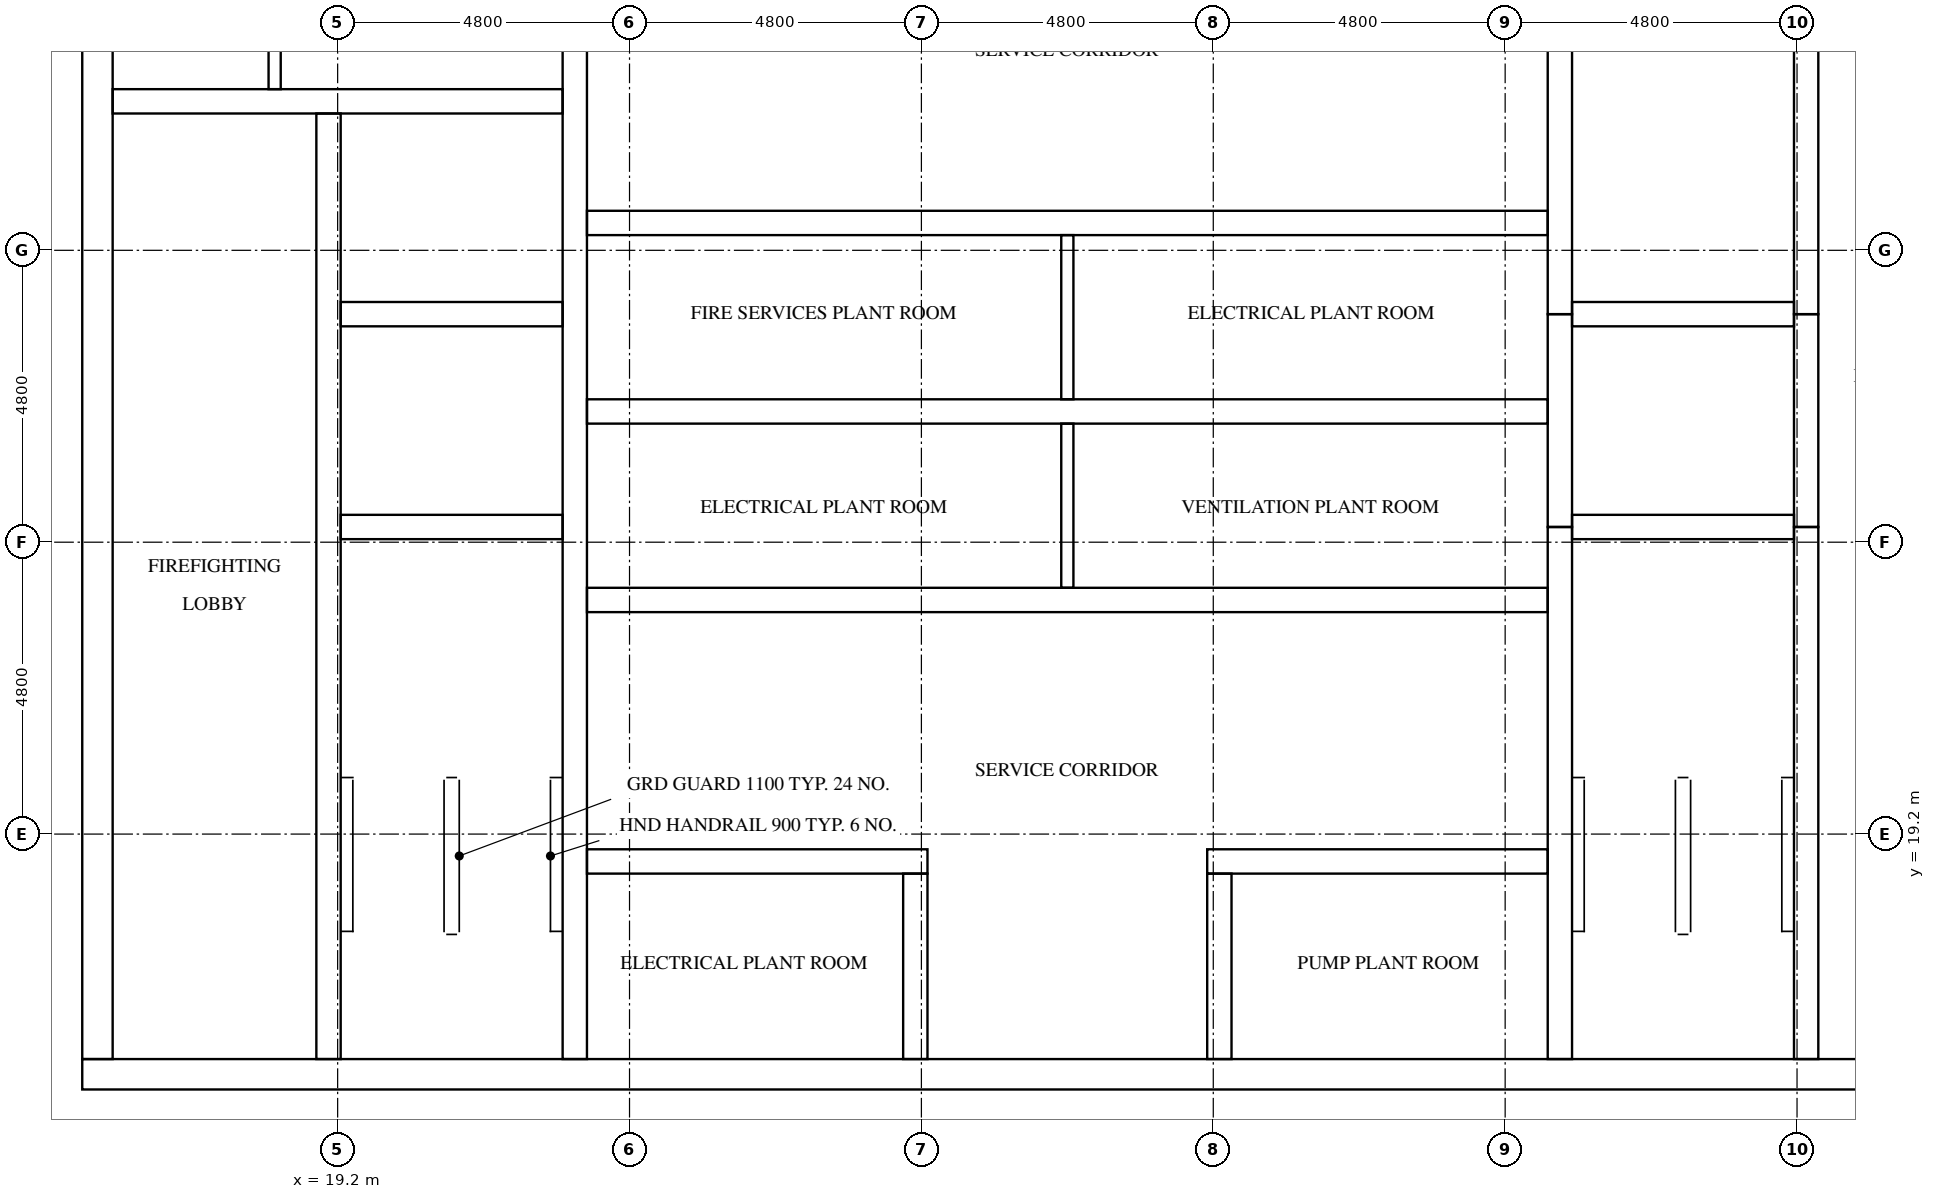
"""IFC4 building model, lengths in metres.
Left out: names, types, materials, properties, quantities, classifications, styles, units other than length and angle.
Written with IfcOpenShell. Run it as: python <this file> out.ifc"""

import sys

from ifc_helpers import new_model, si_unit, direction, frame, frame_2d, origin, place, context, subcontext, project, spatial, rectangle, extrude, element, fill, save


model = new_model("IFC4")
c1 = context("Model", 3, precision=1e-05, world=origin(), true_north=direction((0.0, 1.0)))
c2 = subcontext(c1, "Body", "Model", "MODEL_VIEW")
j1 = project(units=[si_unit("LENGTHUNIT", "METRE"), si_unit("PLANEANGLEUNIT", "RADIAN")], contexts=[c1])
p1 = place(None, origin())
s1 = spatial("IfcSite", under=j1, at=p1, CompositionType="ELEMENT")
p2 = place(p1, origin())
s2 = spatial("IfcBuilding", under=s1, at=p2, CompositionType="ELEMENT")
p3 = place(p2, frame((0.0, 0.0, 314.3)))
s3 = spatial("IfcBuildingStorey", under=s2, at=p3, CompositionType="ELEMENT", Elevation=314.3)
p4 = place(p3, frame((15.0, 15.25, 0.0), z_axis=(0.0, 0.0, 1.0), x_axis=(1.0, 0.0, 0.0)))
e1 = element("IfcWall", 1, at=p4, inside=s3, PredefinedType="SHEAR", context=c2, shape_type="SweptSolid", body=[
    extrude(rectangle(XDim=32.4, YDim=0.5, at=frame_2d((16.2, 0.0))), origin(), (0.0, 0.0, 1.0), 2.6),
])
p5 = place(p4, frame((15.3, 0.0, 0.0)))
e2 = element("IfcOpeningElement", 2, at=p5, cuts=e1, PredefinedType="OPENING", context=c2, shape_type="SweptSolid", body=[
    extrude(rectangle(XDim=1.8, YDim=2.1, at=frame_2d((0.9, 1.05))), frame((0.0, 0.26, 0.0), z_axis=(0.0, -1.0, 0.0), x_axis=(1.0, 0.0, 0.0)), (0.0, 0.0, 1.0), 0.52),
])
p6 = place(p3, frame((15.25, 15.5, 0.0), z_axis=(0.0, 0.0, 1.0), x_axis=(0.0, 1.0, 0.0)))
e3 = element("IfcWall", 3, at=p6, inside=s3, PredefinedType="SHEAR", context=c2, shape_type="SweptSolid", body=[
    extrude(rectangle(XDim=21.8, YDim=0.5, at=frame_2d((10.9, 0.0))), origin(), (0.0, 0.0, 1.0), 2.6),
])
p7 = place(p6, frame((5.26, 0.0, 0.0)))
e4 = element("IfcOpeningElement", 4, at=p7, cuts=e3, PredefinedType="OPENING", context=c2, shape_type="SweptSolid", body=[
    extrude(rectangle(XDim=1.2, YDim=2.1, at=frame_2d((0.6, 1.05))), frame((0.0, 0.26, 0.0), z_axis=(0.0, -1.0, 0.0), x_axis=(1.0, 0.0, 0.0)), (0.0, 0.0, 1.0), 0.52),
])
p8 = place(p3, frame((19.05, 15.5, 0.0), z_axis=(0.0, 0.0, 1.0), x_axis=(0.0, 1.0, 0.0)))
e5 = element("IfcWall", 5, at=p8, inside=s3, PredefinedType="SHEAR", context=c2, shape_type="SweptSolid", body=[
    extrude(rectangle(XDim=15.55, YDim=0.4, at=frame_2d((7.775, 0.0))), origin(), (0.0, 0.0, 1.0), 2.6),
])
p9 = place(p8, frame((9.95, 0.0, 0.0)))
e6 = element("IfcOpeningElement", 6, at=p9, cuts=e5, PredefinedType="OPENING", context=c2, shape_type="SweptSolid", body=[
    extrude(rectangle(XDim=1.1, YDim=2.1, at=frame_2d((0.55, 1.05))), frame((0.0, 0.21, 0.0), z_axis=(0.0, -1.0, 0.0), x_axis=(1.0, 0.0, 0.0)), (0.0, 0.0, 1.0), 0.42),
])
p10 = place(p8, frame((13.45, 0.0, 0.0)))
e7 = element("IfcOpeningElement", 7, at=p10, cuts=e5, PredefinedType="OPENING", context=c2, shape_type="SweptSolid", body=[
    extrude(rectangle(XDim=1.1, YDim=2.1, at=frame_2d((0.55, 1.05))), frame((0.0, 0.21, 0.0), z_axis=(0.0, -1.0, 0.0), x_axis=(1.0, 0.0, 0.0)), (0.0, 0.0, 1.0), 0.42),
])
p11 = place(p8, frame((0.7, 0.0, 0.0)))
e8 = element("IfcOpeningElement", 8, at=p11, cuts=e5, PredefinedType="OPENING", context=c2, shape_type="SweptSolid", body=[
    extrude(rectangle(XDim=1.2, YDim=2.1, at=frame_2d((0.6, 1.05))), frame((0.0, 0.21, 0.0), z_axis=(0.0, -1.0, 0.0), x_axis=(1.0, 0.0, 0.0)), (0.0, 0.0, 1.0), 0.42),
])
p12 = place(p3, frame((23.1, 15.5, 0.0), z_axis=(0.0, 0.0, 1.0), x_axis=(0.0, 1.0, 0.0)))
e9 = element("IfcWall", 9, at=p12, inside=s3, PredefinedType="SHEAR", context=c2, shape_type="SweptSolid", body=[
    extrude(rectangle(XDim=21.8, YDim=0.4, at=frame_2d((10.9, 0.0))), origin(), (0.0, 0.0, 1.0), 2.6),
])
p13 = place(p3, frame((39.3, 15.5, 0.0), z_axis=(0.0, 0.0, 1.0), x_axis=(0.0, 1.0, 0.0)))
e10 = element("IfcWall", 10, at=p13, inside=s3, PredefinedType="SHEAR", context=c2, shape_type="SweptSolid", body=[
    extrude(rectangle(XDim=8.75, YDim=0.4, at=frame_2d((4.375, 0.0))), origin(), (0.0, 0.0, 1.0), 2.6),
])
p14 = place(p3, frame((39.3, 24.25, 0.0), z_axis=(0.0, 0.0, 1.0), x_axis=(0.0, 1.0, 0.0)))
e11 = element("IfcWall", 11, at=p14, inside=s3, PredefinedType="SHEAR", context=c2, shape_type="SweptSolid", body=[
    extrude(rectangle(XDim=3.5, YDim=0.4, at=frame_2d((1.75, 0.0))), origin(), (0.0, 0.0, 1.0), 2.6),
])
p15 = place(p3, frame((39.3, 27.75, 0.0), z_axis=(0.0, 0.0, 1.0), x_axis=(0.0, 1.0, 0.0)))
e12 = element("IfcWall", 12, at=p15, inside=s3, PredefinedType="SHEAR", context=c2, shape_type="SweptSolid", body=[
    extrude(rectangle(XDim=9.55, YDim=0.4, at=frame_2d((4.775, 0.0))), origin(), (0.0, 0.0, 1.0), 2.6),
])
p16 = place(p3, frame((43.35, 15.5, 0.0), z_axis=(0.0, 0.0, 1.0), x_axis=(0.0, 1.0, 0.0)))
e13 = element("IfcWall", 13, at=p16, inside=s3, PredefinedType="SHEAR", context=c2, shape_type="SweptSolid", body=[
    extrude(rectangle(XDim=8.75, YDim=0.4, at=frame_2d((4.375, 0.0))), origin(), (0.0, 0.0, 1.0), 2.6),
])
p17 = place(p16, frame((0.7, 0.0, 0.0)))
e14 = element("IfcOpeningElement", 14, at=p17, cuts=e13, PredefinedType="OPENING", context=c2, shape_type="SweptSolid", body=[
    extrude(rectangle(XDim=1.2, YDim=2.1, at=frame_2d((0.6, 1.05))), frame((0.0, 0.21, 0.0), z_axis=(0.0, -1.0, 0.0), x_axis=(1.0, 0.0, 0.0)), (0.0, 0.0, 1.0), 0.42),
])
p18 = place(p3, frame((43.35, 24.25, 0.0), z_axis=(0.0, 0.0, 1.0), x_axis=(0.0, 1.0, 0.0)))
e15 = element("IfcWall", 15, at=p18, inside=s3, PredefinedType="SHEAR", context=c2, shape_type="SweptSolid", body=[
    extrude(rectangle(XDim=3.5, YDim=0.4, at=frame_2d((1.75, 0.0))), origin(), (0.0, 0.0, 1.0), 2.6),
])
p19 = place(p18, frame((1.2, 0.0, 0.0)))
e16 = element("IfcOpeningElement", 16, at=p19, cuts=e15, PredefinedType="OPENING", context=c2, shape_type="SweptSolid", body=[
    extrude(rectangle(XDim=1.1, YDim=2.1, at=frame_2d((0.55, 1.05))), frame((0.0, 0.21, 0.0), z_axis=(0.0, -1.0, 0.0), x_axis=(1.0, 0.0, 0.0)), (0.0, 0.0, 1.0), 0.42),
])
p20 = place(p3, frame((43.35, 27.75, 0.0), z_axis=(0.0, 0.0, 1.0), x_axis=(0.0, 1.0, 0.0)))
e17 = element("IfcWall", 17, at=p20, inside=s3, PredefinedType="SHEAR", context=c2, shape_type="SweptSolid", body=[
    extrude(rectangle(XDim=9.55, YDim=0.4, at=frame_2d((4.775, 0.0))), origin(), (0.0, 0.0, 1.0), 2.6),
])
p21 = place(p20, frame((7.65, 0.0, 0.0)))
e18 = element("IfcOpeningElement", 18, at=p21, cuts=e17, PredefinedType="OPENING", context=c2, shape_type="SweptSolid", body=[
    extrude(rectangle(XDim=1.2, YDim=2.1, at=frame_2d((0.6, 1.05))), frame((0.0, 0.21, 0.0), z_axis=(0.0, -1.0, 0.0), x_axis=(1.0, 0.0, 0.0)), (0.0, 0.0, 1.0), 0.42),
])
for number, where, z_axis, x_axis in (
    (19, (19.25, 24.25, 0.0), (0.0, 0.0, 1.0), (1.0, 0.0, 0.0)),
    (20, (19.25, 27.75, 0.0), (0.0, 0.0, 1.0), (1.0, 0.0, 0.0)),
):
    element("IfcWall", number, at=place(p3, frame(where, z_axis=z_axis, x_axis=x_axis)), inside=s3, PredefinedType="SHEAR", context=c2, shape_type="SweptSolid", body=[
        extrude(rectangle(XDim=3.65, YDim=0.4, at=frame_2d((1.825, 0.0))), origin(), (0.0, 0.0, 1.0), 2.6),
    ])
p22 = place(p3, frame((15.5, 31.25, 0.0), z_axis=(0.0, 0.0, 1.0), x_axis=(1.0, 0.0, 0.0)))
e21 = element("IfcWall", 21, at=p22, inside=s3, PredefinedType="SHEAR", context=c2, shape_type="SweptSolid", body=[
    extrude(rectangle(XDim=7.4, YDim=0.4, at=frame_2d((3.7, 0.0))), origin(), (0.0, 0.0, 1.0), 2.6),
])
for number, where, z_axis, x_axis in (
    (22, (39.5, 24.25, 0.0), (0.0, 0.0, 1.0), (1.0, 0.0, 0.0)),
    (23, (39.5, 27.75, 0.0), (0.0, 0.0, 1.0), (1.0, 0.0, 0.0)),
):
    element("IfcWall", number, at=place(p3, frame(where, z_axis=z_axis, x_axis=x_axis)), inside=s3, PredefinedType="SHEAR", context=c2, shape_type="SweptSolid", body=[
        extrude(rectangle(XDim=3.65, YDim=0.4, at=frame_2d((1.825, 0.0))), origin(), (0.0, 0.0, 1.0), 2.6),
    ])
p23 = place(p3, frame((23.3, 18.75, 0.0), z_axis=(0.0, 0.0, 1.0), x_axis=(1.0, 0.0, 0.0)))
e24 = element("IfcWall", 24, at=p23, inside=s3, PredefinedType="SHEAR", context=c2, shape_type="SweptSolid", body=[
    extrude(rectangle(XDim=5.6, YDim=0.4, at=frame_2d((2.8, 0.0))), origin(), (0.0, 0.0, 1.0), 2.6),
])
p24 = place(p23, frame((2.1, 0.0, 0.0)))
e25 = element("IfcOpeningElement", 25, at=p24, cuts=e24, PredefinedType="OPENING", context=c2, shape_type="SweptSolid", body=[
    extrude(rectangle(XDim=1.0, YDim=2.1, at=frame_2d((0.5, 1.05))), frame((0.0, 0.21, 0.0), z_axis=(0.0, -1.0, 0.0), x_axis=(1.0, 0.0, 0.0)), (0.0, 0.0, 1.0), 0.42),
])
p25 = place(p3, frame((33.5, 18.75, 0.0), z_axis=(0.0, 0.0, 1.0), x_axis=(1.0, 0.0, 0.0)))
e26 = element("IfcWall", 26, at=p25, inside=s3, PredefinedType="SHEAR", context=c2, shape_type="SweptSolid", body=[
    extrude(rectangle(XDim=5.6, YDim=0.4, at=frame_2d((2.8, 0.0))), origin(), (0.0, 0.0, 1.0), 2.6),
])
p26 = place(p25, frame((2.5, 0.0, 0.0)))
e27 = element("IfcOpeningElement", 27, at=p26, cuts=e26, PredefinedType="OPENING", context=c2, shape_type="SweptSolid", body=[
    extrude(rectangle(XDim=1.0, YDim=2.1, at=frame_2d((0.5, 1.05))), frame((0.0, 0.21, 0.0), z_axis=(0.0, -1.0, 0.0), x_axis=(1.0, 0.0, 0.0)), (0.0, 0.0, 1.0), 0.42),
])
p27 = place(p3, frame((23.3, 23.05, 0.0), z_axis=(0.0, 0.0, 1.0), x_axis=(1.0, 0.0, 0.0)))
e28 = element("IfcWall", 28, at=p27, inside=s3, PredefinedType="SHEAR", context=c2, shape_type="SweptSolid", body=[
    extrude(rectangle(XDim=15.8, YDim=0.4, at=frame_2d((7.9, 0.0))), origin(), (0.0, 0.0, 1.0), 2.6),
])
p28 = place(p27, frame((3.4, 0.0, 0.0)))
e29 = element("IfcOpeningElement", 29, at=p28, cuts=e28, PredefinedType="OPENING", context=c2, shape_type="SweptSolid", body=[
    extrude(rectangle(XDim=1.0, YDim=2.1, at=frame_2d((0.5, 1.05))), frame((0.0, 0.21, 0.0), z_axis=(0.0, -1.0, 0.0), x_axis=(1.0, 0.0, 0.0)), (0.0, 0.0, 1.0), 0.42),
])
p29 = place(p27, frame((11.4, 0.0, 0.0)))
e30 = element("IfcOpeningElement", 30, at=p29, cuts=e28, PredefinedType="OPENING", context=c2, shape_type="SweptSolid", body=[
    extrude(rectangle(XDim=1.0, YDim=2.1, at=frame_2d((0.5, 1.05))), frame((0.0, 0.21, 0.0), z_axis=(0.0, -1.0, 0.0), x_axis=(1.0, 0.0, 0.0)), (0.0, 0.0, 1.0), 0.42),
])
p30 = place(p3, frame((23.3, 26.15, 0.0), z_axis=(0.0, 0.0, 1.0), x_axis=(1.0, 0.0, 0.0)))
e31 = element("IfcWall", 31, at=p30, inside=s3, PredefinedType="SHEAR", context=c2, shape_type="SweptSolid", body=[
    extrude(rectangle(XDim=15.8, YDim=0.4, at=frame_2d((7.9, 0.0))), origin(), (0.0, 0.0, 1.0), 2.6),
])
p31 = place(p3, frame((23.3, 29.25, 0.0), z_axis=(0.0, 0.0, 1.0), x_axis=(1.0, 0.0, 0.0)))
e32 = element("IfcWall", 32, at=p31, inside=s3, PredefinedType="SHEAR", context=c2, shape_type="SweptSolid", body=[
    extrude(rectangle(XDim=15.8, YDim=0.4, at=frame_2d((7.9, 0.0))), origin(), (0.0, 0.0, 1.0), 2.6),
])
p32 = place(p31, frame((3.4, 0.0, 0.0)))
e33 = element("IfcOpeningElement", 33, at=p32, cuts=e32, PredefinedType="OPENING", context=c2, shape_type="SweptSolid", body=[
    extrude(rectangle(XDim=1.0, YDim=2.1, at=frame_2d((0.5, 1.05))), frame((0.0, 0.21, 0.0), z_axis=(0.0, -1.0, 0.0), x_axis=(1.0, 0.0, 0.0)), (0.0, 0.0, 1.0), 0.42),
])
p33 = place(p31, frame((11.4, 0.0, 0.0)))
e34 = element("IfcOpeningElement", 34, at=p33, cuts=e32, PredefinedType="OPENING", context=c2, shape_type="SweptSolid", body=[
    extrude(rectangle(XDim=1.0, YDim=2.1, at=frame_2d((0.5, 1.05))), frame((0.0, 0.21, 0.0), z_axis=(0.0, -1.0, 0.0), x_axis=(1.0, 0.0, 0.0)), (0.0, 0.0, 1.0), 0.42),
])
for number, where, z_axis, x_axis in (
    (35, (28.7, 15.5, 0.0), (0.0, 0.0, 1.0), (0.0, 1.0, 0.0)),
    (36, (33.7, 15.5, 0.0), (0.0, 0.0, 1.0), (0.0, 1.0, 0.0)),
):
    element("IfcWall", number, at=place(p3, frame(where, z_axis=z_axis, x_axis=x_axis)), inside=s3, PredefinedType="SHEAR", context=c2, shape_type="SweptSolid", body=[
        extrude(rectangle(XDim=3.05, YDim=0.4, at=frame_2d((1.525, 0.0))), origin(), (0.0, 0.0, 1.0), 2.6),
    ])
p34 = place(p3, frame((18.164, 31.45, 0.0), z_axis=(0.0, 0.0, 1.0), x_axis=(0.0, 1.0, 0.0)))
e37 = element("IfcWall", 37, at=p34, inside=s3, PredefinedType="PARTITIONING", context=c2, shape_type="SweptSolid", body=[
    extrude(rectangle(XDim=5.85, YDim=0.2, at=frame_2d((2.925, 0.0))), origin(), (0.0, 0.0, 1.0), 2.6),
])
for number, where, z_axis, x_axis in (
    (38, (31.2, 23.25, 0.0), (0.0, 0.0, 1.0), (0.0, 1.0, 0.0)),
    (39, (31.2, 26.35, 0.0), (0.0, 0.0, 1.0), (0.0, 1.0, 0.0)),
):
    element("IfcWall", number, at=place(p3, frame(where, z_axis=z_axis, x_axis=x_axis)), inside=s3, PredefinedType="PARTITIONING", context=c2, shape_type="SweptSolid", body=[
        extrude(rectangle(XDim=2.7, YDim=0.2, at=frame_2d((1.35, 0.0))), origin(), (0.0, 0.0, 1.0), 2.6),
    ])
p35 = place(p9, origin())
e40 = element("IfcDoor", 40, at=p35, inside=s3, OperationType="DOUBLE_DOOR_SLIDING", PredefinedType="DOOR", context=c2, shape_type="SweptSolid", body=[
    extrude(rectangle(XDim=1.1, YDim=2.1, at=frame_2d((0.55, 1.05))), frame((0.0, 0.025, 0.0), z_axis=(0.0, -1.0, 0.0), x_axis=(1.0, 0.0, 0.0)), (0.0, 0.0, 1.0), 0.05),
])
fill(e6, e40)
p36 = place(p10, origin())
e41 = element("IfcDoor", 41, at=p36, inside=s3, OperationType="DOUBLE_DOOR_SLIDING", PredefinedType="DOOR", context=c2, shape_type="SweptSolid", body=[
    extrude(rectangle(XDim=1.1, YDim=2.1, at=frame_2d((0.55, 1.05))), frame((0.0, 0.025, 0.0), z_axis=(0.0, -1.0, 0.0), x_axis=(1.0, 0.0, 0.0)), (0.0, 0.0, 1.0), 0.05),
])
fill(e7, e41)
p37 = place(p19, origin())
e42 = element("IfcDoor", 42, at=p37, inside=s3, OperationType="DOUBLE_DOOR_SLIDING", PredefinedType="DOOR", context=c2, shape_type="SweptSolid", body=[
    extrude(rectangle(XDim=1.1, YDim=2.1, at=frame_2d((0.55, 1.05))), frame((0.0, 0.025, 0.0), z_axis=(0.0, -1.0, 0.0), x_axis=(1.0, 0.0, 0.0)), (0.0, 0.0, 1.0), 0.05),
])
fill(e16, e42)
p38 = place(p11, frame((1.2, 0.0, 0.0), z_axis=(0.0, 0.0, 1.0), x_axis=(-1.0, 0.0, 0.0)))
e43 = element("IfcDoor", 43, at=p38, inside=s3, OperationType="SINGLE_SWING_LEFT", PredefinedType="DOOR", context=c2, shape_type="SweptSolid", body=[
    extrude(rectangle(XDim=1.2, YDim=2.1, at=frame_2d((0.6, 1.05))), frame((0.0, 0.025, 0.0), z_axis=(0.0, -1.0, 0.0), x_axis=(1.0, 0.0, 0.0)), (0.0, 0.0, 1.0), 0.05),
])
fill(e8, e43)
p39 = place(p17, origin())
e44 = element("IfcDoor", 44, at=p39, inside=s3, OperationType="SINGLE_SWING_RIGHT", PredefinedType="DOOR", context=c2, shape_type="SweptSolid", body=[
    extrude(rectangle(XDim=1.2, YDim=2.1, at=frame_2d((0.6, 1.05))), frame((0.0, 0.025, 0.0), z_axis=(0.0, -1.0, 0.0), x_axis=(1.0, 0.0, 0.0)), (0.0, 0.0, 1.0), 0.05),
])
fill(e14, e44)
p40 = place(p5, frame((1.8, 0.0, 0.0), z_axis=(0.0, 0.0, 1.0), x_axis=(-1.0, 0.0, 0.0)))
e45 = element("IfcDoor", 45, at=p40, inside=s3, OperationType="DOUBLE_DOOR_SINGLE_SWING", PredefinedType="DOOR", context=c2, shape_type="SweptSolid", body=[
    extrude(rectangle(XDim=1.8, YDim=2.1, at=frame_2d((0.9, 1.05))), frame((0.0, 0.025, 0.0), z_axis=(0.0, -1.0, 0.0), x_axis=(1.0, 0.0, 0.0)), (0.0, 0.0, 1.0), 0.05),
])
fill(e2, e45)
p41 = place(p7, frame((1.2, 0.0, 0.0), z_axis=(0.0, 0.0, 1.0), x_axis=(-1.0, 0.0, 0.0)))
e46 = element("IfcDoor", 46, at=p41, inside=s3, OperationType="SINGLE_SWING_RIGHT", PredefinedType="DOOR", context=c2, shape_type="SweptSolid", body=[
    extrude(rectangle(XDim=1.2, YDim=2.1, at=frame_2d((0.6, 1.05))), frame((0.0, 0.025, 0.0), z_axis=(0.0, -1.0, 0.0), x_axis=(1.0, 0.0, 0.0)), (0.0, 0.0, 1.0), 0.05),
])
fill(e4, e46)
p42 = place(p28, frame((1.0, 0.0, 0.0), z_axis=(0.0, 0.0, 1.0), x_axis=(-1.0, 0.0, 0.0)))
e47 = element("IfcDoor", 47, at=p42, inside=s3, OperationType="SINGLE_SWING_RIGHT", PredefinedType="DOOR", context=c2, shape_type="SweptSolid", body=[
    extrude(rectangle(XDim=1.0, YDim=2.1, at=frame_2d((0.5, 1.05))), frame((0.0, 0.025, 0.0), z_axis=(0.0, -1.0, 0.0), x_axis=(1.0, 0.0, 0.0)), (0.0, 0.0, 1.0), 0.05),
])
fill(e29, e47)
p43 = place(p29, frame((1.0, 0.0, 0.0), z_axis=(0.0, 0.0, 1.0), x_axis=(-1.0, 0.0, 0.0)))
e48 = element("IfcDoor", 48, at=p43, inside=s3, OperationType="SINGLE_SWING_LEFT", PredefinedType="DOOR", context=c2, shape_type="SweptSolid", body=[
    extrude(rectangle(XDim=1.0, YDim=2.1, at=frame_2d((0.5, 1.05))), frame((0.0, 0.025, 0.0), z_axis=(0.0, -1.0, 0.0), x_axis=(1.0, 0.0, 0.0)), (0.0, 0.0, 1.0), 0.05),
])
fill(e30, e48)
p44 = place(p32, origin())
e49 = element("IfcDoor", 49, at=p44, inside=s3, OperationType="SINGLE_SWING_RIGHT", PredefinedType="DOOR", context=c2, shape_type="SweptSolid", body=[
    extrude(rectangle(XDim=1.0, YDim=2.1, at=frame_2d((0.5, 1.05))), frame((0.0, 0.025, 0.0), z_axis=(0.0, -1.0, 0.0), x_axis=(1.0, 0.0, 0.0)), (0.0, 0.0, 1.0), 0.05),
])
fill(e33, e49)
p45 = place(p33, origin())
e50 = element("IfcDoor", 50, at=p45, inside=s3, OperationType="SINGLE_SWING_LEFT", PredefinedType="DOOR", context=c2, shape_type="SweptSolid", body=[
    extrude(rectangle(XDim=1.0, YDim=2.1, at=frame_2d((0.5, 1.05))), frame((0.0, 0.025, 0.0), z_axis=(0.0, -1.0, 0.0), x_axis=(1.0, 0.0, 0.0)), (0.0, 0.0, 1.0), 0.05),
])
fill(e34, e50)
p46 = place(p24, origin())
e51 = element("IfcDoor", 51, at=p46, inside=s3, OperationType="SINGLE_SWING_RIGHT", PredefinedType="DOOR", context=c2, shape_type="SweptSolid", body=[
    extrude(rectangle(XDim=1.0, YDim=2.1, at=frame_2d((0.5, 1.05))), frame((0.0, 0.025, 0.0), z_axis=(0.0, -1.0, 0.0), x_axis=(1.0, 0.0, 0.0)), (0.0, 0.0, 1.0), 0.05),
])
fill(e25, e51)
p47 = place(p26, origin())
e52 = element("IfcDoor", 52, at=p47, inside=s3, OperationType="SINGLE_SWING_LEFT", PredefinedType="DOOR", context=c2, shape_type="SweptSolid", body=[
    extrude(rectangle(XDim=1.0, YDim=2.1, at=frame_2d((0.5, 1.05))), frame((0.0, 0.025, 0.0), z_axis=(0.0, -1.0, 0.0), x_axis=(1.0, 0.0, 0.0)), (0.0, 0.0, 1.0), 0.05),
])
fill(e27, e52)
save(model, sys.argv[1])
